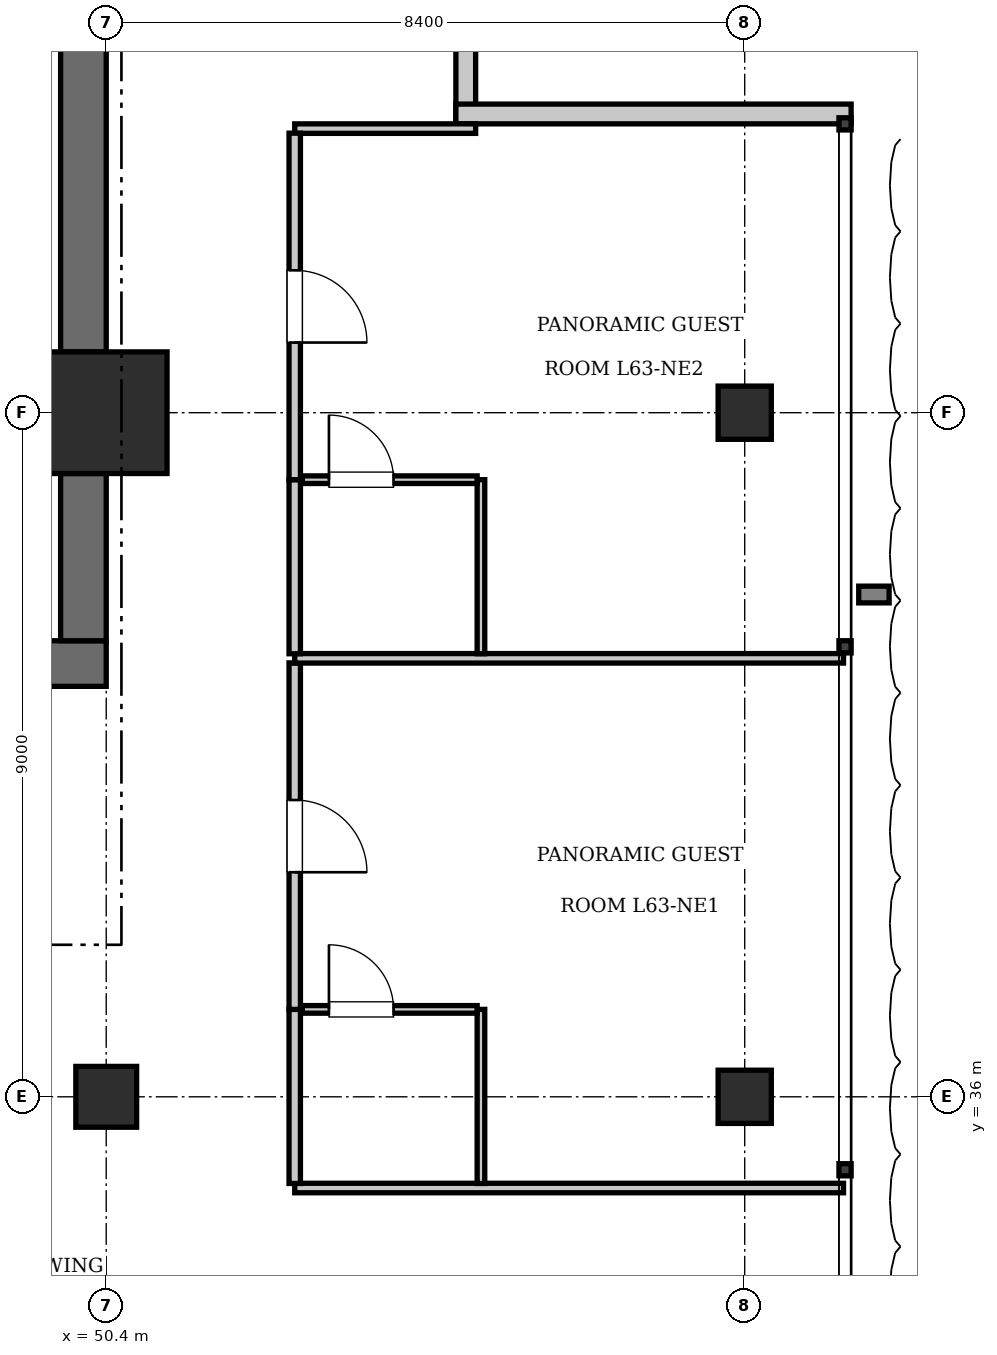
"""IFC4 building model, lengths in metres.
Left out: names, types, materials, properties, quantities, classifications, styles, units other than length and angle.
Written with IfcOpenShell. Run it as: python <this file> out.ifc"""

import sys

from ifc_helpers import new_model, si_unit, direction, frame, frame_2d, origin, origin_2d, place, context, subcontext, project, spatial, rectangle, extrude, element, fill, save


model = new_model("IFC4")
c1 = context("Model", 3, precision=1e-05, world=origin(), true_north=direction((0.0, 1.0)))
c2 = subcontext(c1, "Body", "Model", "MODEL_VIEW")
j1 = project(units=[si_unit("LENGTHUNIT", "METRE"), si_unit("PLANEANGLEUNIT", "RADIAN")], contexts=[c1])
p1 = place(None, origin())
s1 = spatial("IfcSite", under=j1, at=p1, CompositionType="ELEMENT")
p2 = place(p1, origin())
s2 = spatial("IfcBuilding", under=s1, at=p2, CompositionType="ELEMENT")
p3 = place(p2, frame((0.0, 0.0, 258.65)))
s3 = spatial("IfcBuildingStorey", under=s2, at=p3, CompositionType="ELEMENT", Elevation=258.65)
p4 = place(p3, frame((50.4, 45.0, 0.0), z_axis=(0.0, 0.0, 1.0), x_axis=(1.0, 0.0, 0.0)))
e1 = element("IfcColumn", 1, at=p4, inside=s3, PredefinedType="COLUMN", context=c2, shape_type="SweptSolid", body=[
    extrude(rectangle(XDim=1.6, YDim=1.6, at=origin_2d()), origin(), (0.0, 0.0, 1.0), 3.85),
])
p5 = place(p3, frame((43.6, 41.7, 0.0), z_axis=(0.0, 0.0, 1.0), x_axis=(1.0, 0.0, 0.0)))
e2 = element("IfcWall", 2, at=p5, inside=s3, PredefinedType="SHEAR", context=c2, shape_type="SweptSolid", body=[
    extrude(rectangle(XDim=6.8, YDim=0.6, at=frame_2d((3.4, 0.0))), origin(), (0.0, 0.0, 1.0), 3.85),
])
p6 = place(p5, frame((3.9, 0.0, 0.0)))
e3 = element("IfcOpeningElement", 3, at=p6, cuts=e2, PredefinedType="OPENING", context=c2, shape_type="SweptSolid", body=[
    extrude(rectangle(XDim=1.15, YDim=2.15, at=frame_2d((0.575, 1.075))), frame((0.0, 0.31, 0.0), z_axis=(0.0, -1.0, 0.0), x_axis=(1.0, 0.0, 0.0)), (0.0, 0.0, 1.0), 0.62),
])
p7 = place(p5, frame((0.55, 0.0, 0.0)))
e4 = element("IfcOpeningElement", 4, at=p7, cuts=e2, PredefinedType="OPENING", context=c2, shape_type="SweptSolid", body=[
    extrude(rectangle(XDim=1.1, YDim=2.2, at=frame_2d((0.55, 1.1))), frame((0.0, 0.31, 0.0), z_axis=(0.0, -1.0, 0.0), x_axis=(1.0, 0.0, 0.0)), (0.0, 0.0, 1.0), 0.62),
])
p8 = place(p3, frame((50.1, 42.0, 0.0), z_axis=(0.0, 0.0, 1.0), x_axis=(0.0, 1.0, 0.0)))
e5 = element("IfcWall", 5, at=p8, inside=s3, PredefinedType="SHEAR", context=c2, shape_type="SweptSolid", body=[
    extrude(rectangle(XDim=2.2, YDim=0.6, at=frame_2d((1.1, 0.0))), origin(), (0.0, 0.0, 1.0), 3.85),
])
p9 = place(p3, frame((50.1, 45.8, 0.0), z_axis=(0.0, 0.0, 1.0), x_axis=(0.0, 1.0, 0.0)))
e6 = element("IfcWall", 6, at=p9, inside=s3, PredefinedType="SHEAR", context=c2, shape_type="SweptSolid", body=[
    extrude(rectangle(XDim=7.6, YDim=0.6, at=frame_2d((3.8, 0.0))), origin(), (0.0, 0.0, 1.0), 3.85),
])
p10 = place(p3, frame((50.4, 36.0, 0.0), z_axis=(0.0, 0.0, 1.0), x_axis=(1.0, 0.0, 0.0)))
e7 = element("IfcColumn", 7, at=p10, inside=s3, PredefinedType="COLUMN", context=c2, shape_type="SweptSolid", body=[
    extrude(rectangle(XDim=0.8, YDim=0.8, at=origin_2d()), origin(), (0.0, 0.0, 1.0), 3.85),
])
for number, where, z_axis, x_axis in (
    (8, (58.8, 36.0, 0.0), (0.0, 0.0, 1.0), (1.0, 0.0, 0.0)),
    (9, (58.8, 45.0, 0.0), (0.0, 0.0, 1.0), (1.0, 0.0, 0.0)),
):
    element("IfcColumn", number, at=place(p3, frame(where, z_axis=z_axis, x_axis=x_axis)), inside=s3, PredefinedType="COLUMN", context=c2, shape_type="SweptSolid", body=[
        extrude(rectangle(XDim=0.7, YDim=0.7, at=origin_2d()), origin(), (0.0, 0.0, 1.0), 3.85),
    ])
for number, where, z_axis, x_axis in (
    (10, (55.13, 54.0, 0.0), (0.0, 0.0, 1.0), (0.0, -1.0, 0.0)),
    (11, (55.0, 48.93, 0.0), (0.0, 0.0, 1.0), (1.0, 0.0, 0.0)),
):
    element("IfcWall", number, at=place(p3, frame(where, z_axis=z_axis, x_axis=x_axis)), inside=s3, PredefinedType="SOLIDWALL", context=c2, shape_type="SweptSolid", body=[
        extrude(rectangle(XDim=5.2, YDim=0.26, at=frame_2d((2.6, 0.0))), origin(), (0.0, 0.0, 1.0), 3.61),
    ])
p11 = place(p3, frame((52.88, 34.8, 0.0), z_axis=(0.0, 0.0, 1.0), x_axis=(1.0, 0.0, 0.0)))
e12 = element("IfcWall", 12, at=p11, inside=s3, PredefinedType="PARTITIONING", context=c2, shape_type="SweptSolid", body=[
    extrude(rectangle(XDim=7.22, YDim=0.125, at=frame_2d((3.61, 0.0))), origin(), (0.0, 0.0, 1.0), 3.61),
])
p12 = place(p3, frame((52.88, 48.738, 0.0), z_axis=(0.0, 0.0, 1.0), x_axis=(1.0, 0.0, 0.0)))
e13 = element("IfcWall", 13, at=p12, inside=s3, PredefinedType="PARTITIONING", context=c2, shape_type="SweptSolid", body=[
    extrude(rectangle(XDim=2.38, YDim=0.125, at=frame_2d((1.19, 0.0))), origin(), (0.0, 0.0, 1.0), 3.61),
])
p13 = place(p3, frame((52.88, 34.86, 0.0), z_axis=(0.0, 0.0, 1.0), x_axis=(0.0, 1.0, 0.0)))
e14 = element("IfcWall", 14, at=p13, inside=s3, PredefinedType="PARTITIONING", context=c2, shape_type="SweptSolid", body=[
    extrude(rectangle(XDim=2.29, YDim=0.15, at=frame_2d((1.145, 0.0))), origin(), (0.0, 0.0, 1.0), 3.61),
])
p14 = place(p3, frame((52.88, 37.15, 0.0), z_axis=(0.0, 0.0, 1.0), x_axis=(0.0, 1.0, 0.0)))
e15 = element("IfcWall", 15, at=p14, inside=s3, PredefinedType="PARTITIONING", context=c2, shape_type="SweptSolid", body=[
    extrude(rectangle(XDim=4.559, YDim=0.15, at=frame_2d((2.279, 0.0))), origin(), (0.0, 0.0, 1.0), 3.61),
])
p15 = place(p14, frame((1.804, 0.0, 0.0)))
e16 = element("IfcOpeningElement", 16, at=p15, cuts=e15, PredefinedType="OPENING", context=c2, shape_type="SweptSolid", body=[
    extrude(rectangle(XDim=0.95, YDim=2.15, at=frame_2d((0.475, 1.075))), frame((0.0, 0.085, 0.0), z_axis=(0.0, -1.0, 0.0), x_axis=(1.0, 0.0, 0.0)), (0.0, 0.0, 1.0), 0.17),
])
p16 = place(p3, frame((55.33, 34.86, 0.0), z_axis=(0.0, 0.0, 1.0), x_axis=(0.0, 1.0, 0.0)))
e17 = element("IfcWall", 17, at=p16, inside=s3, PredefinedType="PARTITIONING", context=c2, shape_type="SweptSolid", body=[
    extrude(rectangle(XDim=2.29, YDim=0.1, at=frame_2d((1.145, 0.0))), origin(), (0.0, 0.0, 1.0), 3.61),
])
p17 = place(p3, frame((52.98, 37.15, 0.0), z_axis=(0.0, 0.0, 1.0), x_axis=(1.0, 0.0, 0.0)))
e18 = element("IfcWall", 18, at=p17, inside=s3, PredefinedType="PARTITIONING", context=c2, shape_type="SweptSolid", body=[
    extrude(rectangle(XDim=2.3, YDim=0.1, at=frame_2d((1.15, 0.0))), origin(), (0.0, 0.0, 1.0), 3.61),
])
p18 = place(p17, frame((0.35, 0.0, 0.0)))
e19 = element("IfcOpeningElement", 19, at=p18, cuts=e18, PredefinedType="OPENING", context=c2, shape_type="SweptSolid", body=[
    extrude(rectangle(XDim=0.85, YDim=2.1, at=frame_2d((0.425, 1.05))), frame((0.0, 0.06, 0.0), z_axis=(0.0, -1.0, 0.0), x_axis=(1.0, 0.0, 0.0)), (0.0, 0.0, 1.0), 0.12),
])
p19 = place(p3, frame((52.88, 41.769, 0.0), z_axis=(0.0, 0.0, 1.0), x_axis=(1.0, 0.0, 0.0)))
e20 = element("IfcWall", 20, at=p19, inside=s3, PredefinedType="PARTITIONING", context=c2, shape_type="SweptSolid", body=[
    extrude(rectangle(XDim=7.22, YDim=0.125, at=frame_2d((3.61, 0.0))), origin(), (0.0, 0.0, 1.0), 3.61),
])
p20 = place(p3, frame((52.88, 41.829, 0.0), z_axis=(0.0, 0.0, 1.0), x_axis=(0.0, 1.0, 0.0)))
e21 = element("IfcWall", 21, at=p20, inside=s3, PredefinedType="PARTITIONING", context=c2, shape_type="SweptSolid", body=[
    extrude(rectangle(XDim=2.29, YDim=0.15, at=frame_2d((1.145, 0.0))), origin(), (0.0, 0.0, 1.0), 3.61),
])
p21 = place(p3, frame((52.88, 44.119, 0.0), z_axis=(0.0, 0.0, 1.0), x_axis=(0.0, 1.0, 0.0)))
e22 = element("IfcWall", 22, at=p21, inside=s3, PredefinedType="PARTITIONING", context=c2, shape_type="SweptSolid", body=[
    extrude(rectangle(XDim=4.559, YDim=0.15, at=frame_2d((2.279, 0.0))), origin(), (0.0, 0.0, 1.0), 3.61),
])
p22 = place(p21, frame((1.804, 0.0, 0.0)))
e23 = element("IfcOpeningElement", 23, at=p22, cuts=e22, PredefinedType="OPENING", context=c2, shape_type="SweptSolid", body=[
    extrude(rectangle(XDim=0.95, YDim=2.15, at=frame_2d((0.475, 1.075))), frame((0.0, 0.085, 0.0), z_axis=(0.0, -1.0, 0.0), x_axis=(1.0, 0.0, 0.0)), (0.0, 0.0, 1.0), 0.17),
])
p23 = place(p3, frame((55.33, 41.829, 0.0), z_axis=(0.0, 0.0, 1.0), x_axis=(0.0, 1.0, 0.0)))
e24 = element("IfcWall", 24, at=p23, inside=s3, PredefinedType="PARTITIONING", context=c2, shape_type="SweptSolid", body=[
    extrude(rectangle(XDim=2.29, YDim=0.1, at=frame_2d((1.145, 0.0))), origin(), (0.0, 0.0, 1.0), 3.61),
])
p24 = place(p3, frame((52.98, 44.119, 0.0), z_axis=(0.0, 0.0, 1.0), x_axis=(1.0, 0.0, 0.0)))
e25 = element("IfcWall", 25, at=p24, inside=s3, PredefinedType="PARTITIONING", context=c2, shape_type="SweptSolid", body=[
    extrude(rectangle(XDim=2.3, YDim=0.1, at=frame_2d((1.15, 0.0))), origin(), (0.0, 0.0, 1.0), 3.61),
])
p25 = place(p24, frame((0.35, 0.0, 0.0)))
e26 = element("IfcOpeningElement", 26, at=p25, cuts=e25, PredefinedType="OPENING", context=c2, shape_type="SweptSolid", body=[
    extrude(rectangle(XDim=0.85, YDim=2.1, at=frame_2d((0.425, 1.05))), frame((0.0, 0.06, 0.0), z_axis=(0.0, -1.0, 0.0), x_axis=(1.0, 0.0, 0.0)), (0.0, 0.0, 1.0), 0.12),
])
p26 = place(p18, origin())
e27 = element("IfcDoor", 27, at=p26, inside=s3, OperationType="SINGLE_SWING_LEFT", PredefinedType="DOOR", context=c2, shape_type="SweptSolid", body=[
    extrude(rectangle(XDim=0.85, YDim=2.1, at=frame_2d((0.425, 1.05))), frame((0.0, 0.025, 0.0), z_axis=(0.0, -1.0, 0.0), x_axis=(1.0, 0.0, 0.0)), (0.0, 0.0, 1.0), 0.05),
])
fill(e19, e27)
p27 = place(p15, frame((0.95, 0.0, 0.0), z_axis=(0.0, 0.0, 1.0), x_axis=(-1.0, 0.0, 0.0)))
e28 = element("IfcDoor", 28, at=p27, inside=s3, OperationType="SINGLE_SWING_RIGHT", PredefinedType="DOOR", context=c2, shape_type="SweptSolid", body=[
    extrude(rectangle(XDim=0.95, YDim=2.15, at=frame_2d((0.475, 1.075))), frame((0.0, 0.025, 0.0), z_axis=(0.0, -1.0, 0.0), x_axis=(1.0, 0.0, 0.0)), (0.0, 0.0, 1.0), 0.05),
])
fill(e16, e28)
p28 = place(p25, origin())
e29 = element("IfcDoor", 29, at=p28, inside=s3, OperationType="SINGLE_SWING_LEFT", PredefinedType="DOOR", context=c2, shape_type="SweptSolid", body=[
    extrude(rectangle(XDim=0.85, YDim=2.1, at=frame_2d((0.425, 1.05))), frame((0.0, 0.025, 0.0), z_axis=(0.0, -1.0, 0.0), x_axis=(1.0, 0.0, 0.0)), (0.0, 0.0, 1.0), 0.05),
])
fill(e26, e29)
p29 = place(p22, frame((0.95, 0.0, 0.0), z_axis=(0.0, 0.0, 1.0), x_axis=(-1.0, 0.0, 0.0)))
e30 = element("IfcDoor", 30, at=p29, inside=s3, OperationType="SINGLE_SWING_RIGHT", PredefinedType="DOOR", context=c2, shape_type="SweptSolid", body=[
    extrude(rectangle(XDim=0.95, YDim=2.15, at=frame_2d((0.475, 1.075))), frame((0.0, 0.025, 0.0), z_axis=(0.0, -1.0, 0.0), x_axis=(1.0, 0.0, 0.0)), (0.0, 0.0, 1.0), 0.05),
])
fill(e23, e30)
save(model, sys.argv[1])
